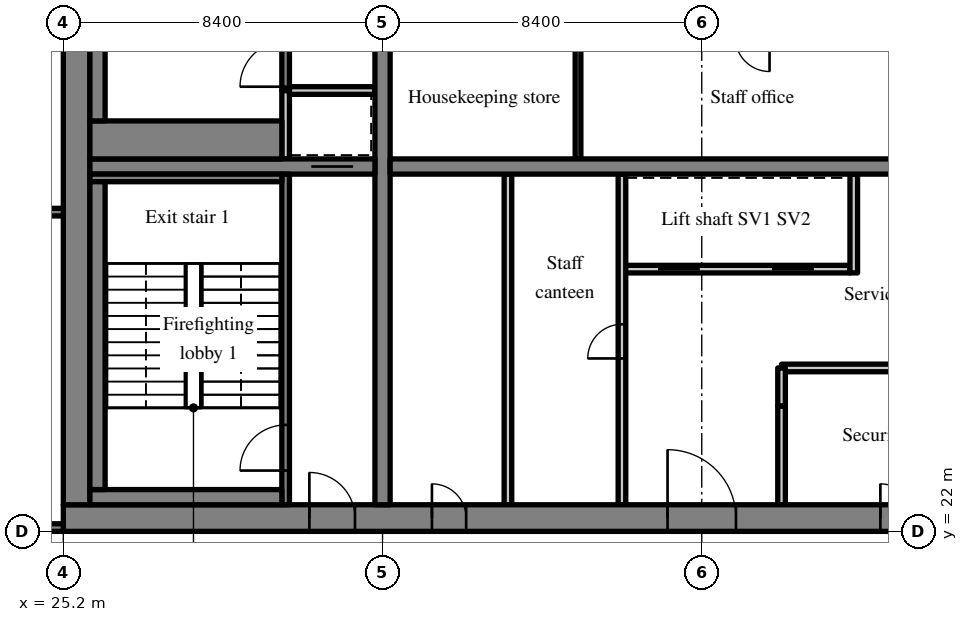
"""IFC4 building model, lengths in metres.
Left out: names, types, materials, properties, quantities, classifications, styles, units other than length and angle.
Written with IfcOpenShell. Run it as: python <this file> out.ifc"""

import sys

from ifc_helpers import new_model, si_unit, direction, frame, frame_2d, origin, place, context, subcontext, project, spatial, rectangle, extrude, source, transform, mapped, element, fill, save


model = new_model("IFC4")
c1 = context("Model", 3, precision=1e-05, world=origin(), true_north=direction((0.0, 1.0)))
c2 = subcontext(c1, "Body", "Model", "MODEL_VIEW")
j1 = project(units=[si_unit("LENGTHUNIT", "METRE"), si_unit("PLANEANGLEUNIT", "RADIAN")], contexts=[c1])
p1 = place(None, origin())
s1 = spatial("IfcSite", under=j1, at=p1, CompositionType="ELEMENT")
p2 = place(p1, origin())
s2 = spatial("IfcBuilding", under=s1, at=p2, CompositionType="ELEMENT")
p3 = place(p2, frame((0.0, 0.0, 170.6)))
s3 = spatial("IfcBuildingStorey", under=s2, at=p3, CompositionType="ELEMENT", Elevation=170.6)
m1 = source(origin(), c2, "Body", "SweptSolid", [
    extrude(rectangle(XDim=50.4, YDim=0.7, at=frame_2d((25.2, 0.0))), origin(), (0.0, 0.0, 1.0), 3.52),
])
p4 = place(p3, frame((25.2, 22.35, 0.0), z_axis=(0.0, 0.0, 1.0), x_axis=(1.0, 0.0, 0.0)))
e1 = element("IfcWall", 1, at=p4, inside=s3, PredefinedType="SHEAR", context=c2, shape_type="MappedRepresentation", body=[
    mapped(m1, transform((0.0, 0.0, 0.0), scale=1.0)),
])
m2 = source(origin(), c2, "Body", "SweptSolid", [
    extrude(rectangle(XDim=1.8, YDim=2.1, at=frame_2d((0.9, 1.05))), frame((0.0, 0.36, 0.0), z_axis=(0.0, -1.0, 0.0), x_axis=(1.0, 0.0, 0.0)), (0.0, 0.0, 1.0), 0.72),
])
p5 = place(p4, frame((15.9, 0.0, 0.0)))
e2 = element("IfcOpeningElement", 2, at=p5, cuts=e1, PredefinedType="OPENING", context=c2, shape_type="MappedRepresentation", body=[
    mapped(m2, transform((0.0, 0.0, 0.0), scale=1.0)),
])
m3 = source(origin(), c2, "Body", "SweptSolid", [
    extrude(rectangle(XDim=0.9, YDim=2.1, at=frame_2d((0.45, 1.05))), frame((0.0, 0.36, 0.0), z_axis=(0.0, -1.0, 0.0), x_axis=(1.0, 0.0, 0.0)), (0.0, 0.0, 1.0), 0.72),
])
p6 = place(p4, frame((9.7, 0.0, 0.0)))
e3 = element("IfcOpeningElement", 3, at=p6, cuts=e1, PredefinedType="OPENING", context=c2, shape_type="MappedRepresentation", body=[
    mapped(m3, transform((0.0, 0.0, 0.0), scale=1.0)),
])
p7 = place(p4, frame((21.5, 0.0, 0.0)))
e4 = element("IfcOpeningElement", 4, at=p7, cuts=e1, PredefinedType="OPENING", context=c2, shape_type="MappedRepresentation", body=[
    mapped(m3, transform((0.0, 0.0, 0.0), scale=1.0)),
])
p8 = place(p4, frame((32.7, 0.0, 0.0)))
e5 = element("IfcOpeningElement", 5, at=p8, cuts=e1, PredefinedType="OPENING", context=c2, shape_type="MappedRepresentation", body=[
    mapped(m2, transform((0.0, 0.0, 0.0), scale=1.0)),
])
m4 = source(origin(), c2, "Body", "SweptSolid", [
    extrude(rectangle(XDim=1.2, YDim=2.1, at=frame_2d((0.6, 1.05))), frame((0.0, 0.36, 0.0), z_axis=(0.0, -1.0, 0.0), x_axis=(1.0, 0.0, 0.0)), (0.0, 0.0, 1.0), 0.72),
])
p9 = place(p4, frame((6.475, 0.0, 0.0)))
e6 = element("IfcOpeningElement", 6, at=p9, cuts=e1, PredefinedType="OPENING", context=c2, shape_type="MappedRepresentation", body=[
    mapped(m4, transform((0.0, 0.0, 0.0), scale=1.0)),
])
p10 = place(p4, frame((47.875, 0.0, 0.0)))
e7 = element("IfcOpeningElement", 7, at=p10, cuts=e1, PredefinedType="OPENING", context=c2, shape_type="MappedRepresentation", body=[
    mapped(m4, transform((0.0, 0.0, 0.0), scale=1.0)),
])
m5 = source(origin(), c2, "Body", "SweptSolid", [
    extrude(rectangle(XDim=18.6, YDim=0.7, at=frame_2d((9.3, 0.0))), origin(), (0.0, 0.0, 1.0), 3.52),
])
p11 = place(p3, frame((25.55, 22.7, 0.0), z_axis=(0.0, 0.0, 1.0), x_axis=(0.0, 1.0, 0.0)))
e8 = element("IfcWall", 8, at=p11, inside=s3, PredefinedType="SHEAR", context=c2, shape_type="MappedRepresentation", body=[
    mapped(m5, transform((0.0, 0.0, 0.0), scale=1.0)),
])
m6 = source(origin(), c2, "Body", "SweptSolid", [
    extrude(rectangle(XDim=18.6, YDim=0.4, at=frame_2d((9.3, 0.0))), origin(), (0.0, 0.0, 1.0), 3.52),
])
p12 = place(p3, frame((33.6, 22.7, 0.0), z_axis=(0.0, 0.0, 1.0), x_axis=(0.0, 1.0, 0.0)))
e9 = element("IfcWall", 9, at=p12, inside=s3, PredefinedType="SHEAR", context=c2, shape_type="MappedRepresentation", body=[
    mapped(m6, transform((0.0, 0.0, 0.0), scale=1.0)),
])
m7 = source(origin(), c2, "Body", "SweptSolid", [
    extrude(rectangle(XDim=1.1, YDim=2.1, at=frame_2d((0.55, 1.05))), frame((0.0, 0.21, 0.0), z_axis=(0.0, -1.0, 0.0), x_axis=(1.0, 0.0, 0.0)), (0.0, 0.0, 1.0), 0.42),
])
p13 = place(p12, frame((12.75, 0.0, 0.0)))
e10 = element("IfcOpeningElement", 10, at=p13, cuts=e9, PredefinedType="OPENING", context=c2, shape_type="MappedRepresentation", body=[
    mapped(m7, transform((0.0, 0.0, 0.0), scale=1.0)),
])
m8 = source(origin(), c2, "Body", "SweptSolid", [
    extrude(rectangle(XDim=7.5, YDim=0.4, at=frame_2d((3.75, 0.0))), origin(), (0.0, 0.0, 1.0), 3.52),
])
p14 = place(p3, frame((25.9, 31.6, 0.0), z_axis=(0.0, 0.0, 1.0), x_axis=(1.0, 0.0, 0.0)))
e11 = element("IfcWall", 11, at=p14, inside=s3, PredefinedType="SHEAR", context=c2, shape_type="MappedRepresentation", body=[
    mapped(m8, transform((0.0, 0.0, 0.0), scale=1.0)),
])
p15 = place(p14, frame((5.825, 0.0, 0.0)))
e12 = element("IfcOpeningElement", 12, at=p15, cuts=e11, PredefinedType="OPENING", context=c2, shape_type="MappedRepresentation", body=[
    mapped(m7, transform((0.0, 0.0, 0.0), scale=1.0)),
])
m9 = source(origin(), c2, "Body", "SweptSolid", [
    extrude(rectangle(XDim=16.4, YDim=0.4, at=frame_2d((8.2, 0.0))), origin(), (0.0, 0.0, 1.0), 3.52),
])
p16 = place(p3, frame((33.8, 31.6, 0.0), z_axis=(0.0, 0.0, 1.0), x_axis=(1.0, 0.0, 0.0)))
e13 = element("IfcWall", 13, at=p16, inside=s3, PredefinedType="SHEAR", context=c2, shape_type="MappedRepresentation", body=[
    mapped(m9, transform((0.0, 0.0, 0.0), scale=1.0)),
])
m10 = source(origin(), c2, "Body", "SweptSolid", [
    extrude(rectangle(XDim=1.0, YDim=2.1, at=frame_2d((0.5, 1.05))), frame((0.0, 0.21, 0.0), z_axis=(0.0, -1.0, 0.0), x_axis=(1.0, 0.0, 0.0)), (0.0, 0.0, 1.0), 0.42),
])
p17 = place(p16, frame((14.8, 0.0, 0.0)))
e14 = element("IfcOpeningElement", 14, at=p17, cuts=e13, PredefinedType="OPENING", context=c2, shape_type="MappedRepresentation", body=[
    mapped(m10, transform((0.0, 0.0, 0.0), scale=1.0)),
])
m11 = source(origin(), c2, "Body", "SweptSolid", [
    extrude(rectangle(XDim=6.0, YDim=0.2, at=frame_2d((3.0, 0.0))), origin(), (0.0, 0.0, 1.0), 3.52),
])
p18 = place(p3, frame((39.9, 28.9, 0.0), z_axis=(0.0, 0.0, 1.0), x_axis=(1.0, 0.0, 0.0)))
e15 = element("IfcWall", 15, at=p18, inside=s3, PredefinedType="SOLIDWALL", context=c2, shape_type="MappedRepresentation", body=[
    mapped(m11, transform((0.0, 0.0, 0.0), scale=1.0)),
])
m12 = source(origin(), c2, "Body", "SweptSolid", [
    extrude(rectangle(XDim=1.1, YDim=2.1, at=frame_2d((0.55, 1.05))), frame((0.0, 0.11, 0.0), z_axis=(0.0, -1.0, 0.0), x_axis=(1.0, 0.0, 0.0)), (0.0, 0.0, 1.0), 0.22),
])
p19 = place(p18, frame((0.95, 0.0, 0.0)))
e16 = element("IfcOpeningElement", 16, at=p19, cuts=e15, PredefinedType="OPENING", context=c2, shape_type="MappedRepresentation", body=[
    mapped(m12, transform((0.0, 0.0, 0.0), scale=1.0)),
])
p20 = place(p18, frame((3.95, 0.0, 0.0)))
e17 = element("IfcOpeningElement", 17, at=p20, cuts=e15, PredefinedType="OPENING", context=c2, shape_type="MappedRepresentation", body=[
    mapped(m12, transform((0.0, 0.0, 0.0), scale=1.0)),
])
m13 = source(origin(), c2, "Body", "SweptSolid", [
    extrude(rectangle(XDim=8.7, YDim=0.2, at=frame_2d((4.35, 0.0))), origin(), (0.0, 0.0, 1.0), 3.52),
])
p21 = place(p3, frame((39.9, 22.7, 0.0), z_axis=(0.0, 0.0, 1.0), x_axis=(0.0, 1.0, 0.0)))
e18 = element("IfcWall", 18, at=p21, inside=s3, PredefinedType="PARTITIONING", context=c2, shape_type="MappedRepresentation", body=[
    mapped(m13, transform((0.0, 0.0, 0.0), scale=1.0)),
])
m14 = source(origin(), c2, "Body", "SweptSolid", [
    extrude(rectangle(XDim=0.9, YDim=2.1, at=frame_2d((0.45, 1.05))), frame((0.0, 0.11, 0.0), z_axis=(0.0, -1.0, 0.0), x_axis=(1.0, 0.0, 0.0)), (0.0, 0.0, 1.0), 0.22),
])
p22 = place(p21, frame((3.85, 0.0, 0.0)))
e19 = element("IfcOpeningElement", 19, at=p22, cuts=e18, PredefinedType="OPENING", context=c2, shape_type="MappedRepresentation", body=[
    mapped(m14, transform((0.0, 0.0, 0.0), scale=1.0)),
])
m15 = source(origin(), c2, "Body", "SweptSolid", [
    extrude(rectangle(XDim=2.6, YDim=0.2, at=frame_2d((1.3, 0.0))), origin(), (0.0, 0.0, 1.0), 3.52),
])
p23 = place(p3, frame((44.1, 22.7, 0.0), z_axis=(0.0, 0.0, 1.0), x_axis=(0.0, 1.0, 0.0)))
e20 = element("IfcWall", 20, at=p23, inside=s3, PredefinedType="PARTITIONING", context=c2, shape_type="MappedRepresentation", body=[
    mapped(m15, transform((0.0, 0.0, 0.0), scale=1.0)),
])
m16 = source(origin(), c2, "Body", "SweptSolid", [
    extrude(rectangle(XDim=2.6, YDim=0.2, at=frame_2d((1.3, 0.0))), origin(), (0.0, 0.0, 1.0), 3.52),
])
p24 = place(p3, frame((46.0, 28.8, 0.0), z_axis=(0.0, 0.0, 1.0), x_axis=(0.0, 1.0, 0.0)))
e21 = element("IfcWall", 21, at=p24, inside=s3, PredefinedType="SOLIDWALL", context=c2, shape_type="MappedRepresentation", body=[
    mapped(m16, transform((0.0, 0.0, 0.0), scale=1.0)),
])
p25 = place(p3, frame((36.9, 22.7, 0.0), z_axis=(0.0, 0.0, 1.0), x_axis=(0.0, 1.0, 0.0)))
e22 = element("IfcWall", 22, at=p25, inside=s3, PredefinedType="PARTITIONING", context=c2, shape_type="MappedRepresentation", body=[
    mapped(m13, transform((0.0, 0.0, 0.0), scale=1.0)),
])
m17 = source(origin(), c2, "Body", "SweptSolid", [
    extrude(rectangle(XDim=6.1, YDim=0.2, at=frame_2d((3.05, 0.0))), origin(), (0.0, 0.0, 1.0), 3.52),
])
p26 = place(p3, frame((44.1, 26.3, 0.0), z_axis=(0.0, 0.0, 1.0), x_axis=(1.0, 0.0, 0.0)))
e23 = element("IfcWall", 23, at=p26, inside=s3, PredefinedType="PARTITIONING", context=c2, shape_type="MappedRepresentation", body=[
    mapped(m17, transform((0.0, 0.0, 0.0), scale=1.0)),
])
m18 = source(origin(), c2, "Body", "SweptSolid", [
    extrude(rectangle(XDim=1.0, YDim=0.2, at=frame_2d((0.5, 0.0))), origin(), (0.0, 0.0, 1.0), 3.52),
])
p27 = place(p3, frame((44.1, 25.3, 0.0), z_axis=(0.0, 0.0, 1.0), x_axis=(0.0, 1.0, 0.0)))
e24 = element("IfcWall", 24, at=p27, inside=s3, PredefinedType="PARTITIONING", context=c2, shape_type="MappedRepresentation", body=[
    mapped(m18, transform((0.0, 0.0, 0.0), scale=1.0)),
])
m19 = source(origin(), c2, "Body", "SweptSolid", [
    extrude(rectangle(XDim=3.2, YDim=0.15, at=frame_2d((1.6, 0.0))), origin(), (0.0, 0.0, 1.0), 3.52),
])
p28 = place(p3, frame((38.744, 31.8, 0.0), z_axis=(0.0, 0.0, 1.0), x_axis=(0.0, 1.0, 0.0)))
e25 = element("IfcWall", 25, at=p28, inside=s3, PredefinedType="PARTITIONING", context=c2, shape_type="MappedRepresentation", body=[
    mapped(m19, transform((0.0, 0.0, 0.0), scale=1.0)),
])
m20 = source(origin(), c2, "Body", "SweptSolid", [
    extrude(rectangle(XDim=8.7, YDim=0.2, at=frame_2d((4.35, 0.0))), origin(), (0.0, 0.0, 1.0), 3.52),
])
p29 = place(p3, frame((31.05, 22.7, 0.0), z_axis=(0.0, 0.0, 1.0), x_axis=(0.0, 1.0, 0.0)))
e26 = element("IfcWall", 26, at=p29, inside=s3, PredefinedType="SOLIDWALL", context=c2, shape_type="MappedRepresentation", body=[
    mapped(m20, transform((0.0, 0.0, 0.0), scale=1.0)),
])
m21 = source(origin(), c2, "Body", "SweptSolid", [
    extrude(rectangle(XDim=1.2, YDim=2.1, at=frame_2d((0.6, 1.05))), frame((0.0, 0.11, 0.0), z_axis=(0.0, -1.0, 0.0), x_axis=(1.0, 0.0, 0.0)), (0.0, 0.0, 1.0), 0.22),
])
p30 = place(p29, frame((0.9, 0.0, 0.0)))
e27 = element("IfcOpeningElement", 27, at=p30, cuts=e26, PredefinedType="OPENING", context=c2, shape_type="MappedRepresentation", body=[
    mapped(m21, transform((0.0, 0.0, 0.0), scale=1.0)),
])
m22 = source(origin(), c2, "Body", "SweptSolid", [
    extrude(rectangle(XDim=1.8, YDim=0.2, at=frame_2d((0.9, 0.0))), origin(), (0.0, 0.0, 1.0), 3.52),
])
p31 = place(p3, frame((31.05, 31.8, 0.0), z_axis=(0.0, 0.0, 1.0), x_axis=(0.0, 1.0, 0.0)))
e28 = element("IfcWall", 28, at=p31, inside=s3, PredefinedType="SOLIDWALL", context=c2, shape_type="MappedRepresentation", body=[
    mapped(m22, transform((0.0, 0.0, 0.0), scale=1.0)),
])
m23 = source(origin(), c2, "Body", "SweptSolid", [
    extrude(rectangle(XDim=2.25, YDim=0.2, at=frame_2d((1.125, 0.0))), origin(), (0.0, 0.0, 1.0), 3.52),
])
p32 = place(p3, frame((31.15, 33.6, 0.0), z_axis=(0.0, 0.0, 1.0), x_axis=(1.0, 0.0, 0.0)))
e29 = element("IfcWall", 29, at=p32, inside=s3, PredefinedType="SOLIDWALL", context=c2, shape_type="MappedRepresentation", body=[
    mapped(m23, transform((0.0, 0.0, 0.0), scale=1.0)),
])
m24 = source(origin(), c2, "Body", "SweptSolid", [
    extrude(rectangle(XDim=7.7, YDim=0.2, at=frame_2d((3.85, 0.0))), origin(), (0.0, 0.0, 1.0), 3.52),
])
p33 = place(p3, frame((31.05, 33.6, 0.0), z_axis=(0.0, 0.0, 1.0), x_axis=(0.0, 1.0, 0.0)))
e30 = element("IfcWall", 30, at=p33, inside=s3, PredefinedType="SOLIDWALL", context=c2, shape_type="MappedRepresentation", body=[
    mapped(m24, transform((0.0, 0.0, 0.0), scale=1.0)),
])
p34 = place(p33, frame((0.1, 0.0, 0.0)))
e31 = element("IfcOpeningElement", 31, at=p34, cuts=e30, PredefinedType="OPENING", context=c2, shape_type="MappedRepresentation", body=[
    mapped(m21, transform((0.0, 0.0, 0.0), scale=1.0)),
])
m25 = source(origin(), c2, "Body", "SweptSolid", [
    extrude(rectangle(XDim=8.25, YDim=0.2, at=frame_2d((4.125, 0.0))), origin(), (0.0, 0.0, 1.0), 3.52),
])
p35 = place(p3, frame((16.95, 22.1, 0.0), z_axis=(0.0, 0.0, 1.0), x_axis=(1.0, 0.0, 0.0)))
e32 = element("IfcWall", 32, at=p35, inside=s3, PredefinedType="SOLIDWALL", context=c2, shape_type="MappedRepresentation", body=[
    mapped(m25, transform((0.0, 0.0, 0.0), scale=1.0)),
])
p36 = place(p35, frame((6.05, 0.0, 0.0)))
e33 = element("IfcOpeningElement", 33, at=p36, cuts=e32, PredefinedType="OPENING", context=c2, shape_type="MappedRepresentation", body=[
    mapped(m21, transform((0.0, 0.0, 0.0), scale=1.0)),
])
p37 = place(p3, frame((16.95, 30.4, 0.0), z_axis=(0.0, 0.0, 1.0), x_axis=(1.0, 0.0, 0.0)))
e34 = element("IfcWall", 34, at=p37, inside=s3, PredefinedType="SOLIDWALL", context=c2, shape_type="MappedRepresentation", body=[
    mapped(m25, transform((0.0, 0.0, 0.0), scale=1.0)),
])
m26 = source(origin(), c2, "Body", "SweptSolid", [
    extrude(rectangle(XDim=1.0, YDim=2.1, at=frame_2d((0.5, 1.05))), frame((0.0, 0.11, 0.0), z_axis=(0.0, -1.0, 0.0), x_axis=(1.0, 0.0, 0.0)), (0.0, 0.0, 1.0), 0.22),
])
p38 = place(p37, frame((6.15, 0.0, 0.0)))
e35 = element("IfcOpeningElement", 35, at=p38, cuts=e34, PredefinedType="OPENING", context=c2, shape_type="MappedRepresentation", body=[
    mapped(m26, transform((0.0, 0.0, 0.0), scale=1.0)),
])
m27 = source(origin(), c2, "Body", "SweptSolid", [
    extrude(rectangle(XDim=5.05, YDim=0.4, at=frame_2d((2.525, 0.0))), origin(), (0.0, 0.0, 1.0), 3.52),
])
p39 = place(p3, frame((25.9, 22.9, 0.0), z_axis=(0.0, 0.0, 1.0), x_axis=(1.0, 0.0, 0.0)))
e36 = element("IfcWall", 36, at=p39, inside=s3, PredefinedType="SOLIDWALL", context=c2, shape_type="MappedRepresentation", body=[
    mapped(m27, transform((0.0, 0.0, 0.0), scale=1.0)),
])
m28 = source(origin(), c2, "Body", "SweptSolid", [
    extrude(rectangle(XDim=5.05, YDim=0.2, at=frame_2d((2.525, 0.0))), origin(), (0.0, 0.0, 1.0), 3.52),
])
p40 = place(p3, frame((25.9, 31.3, 0.0), z_axis=(0.0, 0.0, 1.0), x_axis=(1.0, 0.0, 0.0)))
e37 = element("IfcWall", 37, at=p40, inside=s3, PredefinedType="SOLIDWALL", context=c2, shape_type="MappedRepresentation", body=[
    mapped(m28, transform((0.0, 0.0, 0.0), scale=1.0)),
])
m29 = source(origin(), c2, "Body", "SweptSolid", [
    extrude(rectangle(XDim=8.1, YDim=0.4, at=frame_2d((4.05, 0.0))), origin(), (0.0, 0.0, 1.0), 3.52),
])
p41 = place(p3, frame((26.1, 23.1, 0.0), z_axis=(0.0, 0.0, 1.0), x_axis=(0.0, 1.0, 0.0)))
e38 = element("IfcWall", 38, at=p41, inside=s3, PredefinedType="SOLIDWALL", context=c2, shape_type="MappedRepresentation", body=[
    mapped(m29, transform((0.0, 0.0, 0.0), scale=1.0)),
])
m30 = source(origin(), c2, "Body", "SweptSolid", [
    extrude(rectangle(XDim=5.05, YDim=1.0, at=frame_2d((2.525, 0.0))), origin(), (0.0, 0.0, 1.0), 3.52),
])
p42 = place(p3, frame((25.9, 32.3, 0.0), z_axis=(0.0, 0.0, 1.0), x_axis=(1.0, 0.0, 0.0)))
e39 = element("IfcWall", 39, at=p42, inside=s3, PredefinedType="SOLIDWALL", context=c2, shape_type="MappedRepresentation", body=[
    mapped(m30, transform((0.0, 0.0, 0.0), scale=1.0)),
])
p43 = place(p3, frame((26.1, 32.8, 0.0), z_axis=(0.0, 0.0, 1.0), x_axis=(0.0, 1.0, 0.0)))
e40 = element("IfcWall", 40, at=p43, inside=s3, PredefinedType="SOLIDWALL", context=c2, shape_type="MappedRepresentation", body=[
    mapped(m29, transform((0.0, 0.0, 0.0), scale=1.0)),
])
m31 = source(origin(), c2, "Body", "SweptSolid", [
    extrude(rectangle(XDim=1.8, YDim=2.1, at=frame_2d((0.9, 1.05))), frame((0.0, 0.275, 0.0), z_axis=(0.0, -1.0, 0.0), x_axis=(1.0, 0.0, 0.0)), (0.0, 0.0, 1.0), 0.05),
])
p44 = place(p5, origin())
e41 = element("IfcDoor", 41, at=p44, inside=s3, OperationType="DOUBLE_DOOR_SINGLE_SWING", PredefinedType="DOOR", context=c2, shape_type="MappedRepresentation", body=[
    mapped(m31, transform((0.0, 0.0, 0.0), scale=1.0)),
])
fill(e2, e41)
m32 = source(origin(), c2, "Body", "SweptSolid", [
    extrude(rectangle(XDim=1.1, YDim=2.1, at=frame_2d((0.55, 1.05))), frame((0.0, 0.025, 0.0), z_axis=(0.0, -1.0, 0.0), x_axis=(1.0, 0.0, 0.0)), (0.0, 0.0, 1.0), 0.05),
])
p45 = place(p19, origin())
e42 = element("IfcDoor", 42, at=p45, inside=s3, OperationType="SLIDING_TO_LEFT", PredefinedType="DOOR", context=c2, shape_type="MappedRepresentation", body=[
    mapped(m32, transform((0.0, 0.0, 0.0), scale=1.0)),
])
fill(e16, e42)
p46 = place(p20, origin())
e43 = element("IfcDoor", 43, at=p46, inside=s3, OperationType="SLIDING_TO_RIGHT", PredefinedType="DOOR", context=c2, shape_type="MappedRepresentation", body=[
    mapped(m32, transform((0.0, 0.0, 0.0), scale=1.0)),
])
fill(e17, e43)
m33 = source(origin(), c2, "Body", "SweptSolid", [
    extrude(rectangle(XDim=0.9, YDim=2.1, at=frame_2d((0.45, 1.05))), frame((0.0, 0.275, 0.0), z_axis=(0.0, -1.0, 0.0), x_axis=(1.0, 0.0, 0.0)), (0.0, 0.0, 1.0), 0.05),
])
p47 = place(p6, origin())
e44 = element("IfcDoor", 44, at=p47, inside=s3, OperationType="SINGLE_SWING_LEFT", PredefinedType="DOOR", context=c2, shape_type="MappedRepresentation", body=[
    mapped(m33, transform((0.0, 0.0, 0.0), scale=1.0)),
])
fill(e3, e44)
m34 = source(origin(), c2, "Body", "SweptSolid", [
    extrude(rectangle(XDim=0.9, YDim=2.1, at=frame_2d((0.45, 1.05))), frame((0.0, 0.025, 0.0), z_axis=(0.0, -1.0, 0.0), x_axis=(1.0, 0.0, 0.0)), (0.0, 0.0, 1.0), 0.05),
])
p48 = place(p22, origin())
e45 = element("IfcDoor", 45, at=p48, inside=s3, OperationType="SINGLE_SWING_LEFT", PredefinedType="DOOR", context=c2, shape_type="MappedRepresentation", body=[
    mapped(m34, transform((0.0, 0.0, 0.0), scale=1.0)),
])
fill(e19, e45)
p49 = place(p7, origin())
e46 = element("IfcDoor", 46, at=p49, inside=s3, OperationType="SINGLE_SWING_LEFT", PredefinedType="DOOR", context=c2, shape_type="MappedRepresentation", body=[
    mapped(m33, transform((0.0, 0.0, 0.0), scale=1.0)),
])
fill(e4, e46)
m35 = source(origin(), c2, "Body", "SweptSolid", [
    extrude(rectangle(XDim=1.2, YDim=2.1, at=frame_2d((0.6, 1.05))), frame((0.0, 0.025, 0.0), z_axis=(0.0, -1.0, 0.0), x_axis=(1.0, 0.0, 0.0)), (0.0, 0.0, 1.0), 0.05),
])
p50 = place(p30, origin())
e47 = element("IfcDoor", 47, at=p50, inside=s3, OperationType="SINGLE_SWING_LEFT", PredefinedType="DOOR", context=c2, shape_type="MappedRepresentation", body=[
    mapped(m35, transform((0.0, 0.0, 0.0), scale=1.0)),
])
fill(e27, e47)
m36 = source(origin(), c2, "Body", "SweptSolid", [
    extrude(rectangle(XDim=1.2, YDim=2.1, at=frame_2d((0.6, 1.05))), frame((0.0, 0.275, 0.0), z_axis=(0.0, -1.0, 0.0), x_axis=(1.0, 0.0, 0.0)), (0.0, 0.0, 1.0), 0.05),
])
p51 = place(p9, origin())
e48 = element("IfcDoor", 48, at=p51, inside=s3, OperationType="SINGLE_SWING_LEFT", PredefinedType="DOOR", context=c2, shape_type="MappedRepresentation", body=[
    mapped(m36, transform((0.0, 0.0, 0.0), scale=1.0)),
])
fill(e6, e48)
p52 = place(p15, origin())
e49 = element("IfcDoor", 49, at=p52, inside=s3, OperationType="SLIDING_TO_LEFT", PredefinedType="DOOR", context=c2, shape_type="MappedRepresentation", body=[
    mapped(m32, transform((0.0, 0.0, 0.0), scale=1.0)),
])
fill(e12, e49)
p53 = place(p34, origin())
e50 = element("IfcDoor", 50, at=p53, inside=s3, OperationType="SINGLE_SWING_LEFT", PredefinedType="DOOR", context=c2, shape_type="MappedRepresentation", body=[
    mapped(m35, transform((0.0, 0.0, 0.0), scale=1.0)),
])
fill(e31, e50)
save(model, sys.argv[1])
